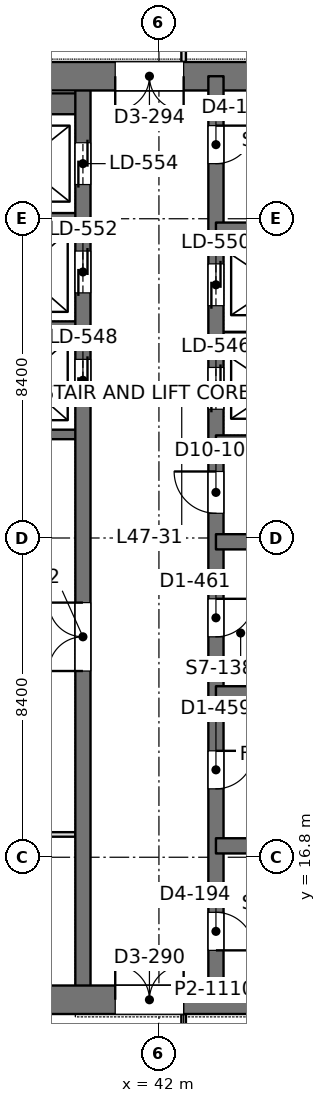
"""IFC4 building model, lengths in metres.
Left out: names, types, materials, properties, quantities, classifications, styles, units other than length and angle.
Written with IfcOpenShell. Run it as: python <this file> out.ifc"""

import sys

from ifc_helpers import new_model, si_unit, direction, frame, frame_2d, origin, place, context, subcontext, project, spatial, rectangle, extrude, element, fill, save


model = new_model("IFC4")
c1 = context("Model", 3, precision=1e-05, world=origin(), true_north=direction((0.0, 1.0)))
c2 = subcontext(c1, "Body", "Model", "MODEL_VIEW")
j1 = project(units=[si_unit("LENGTHUNIT", "METRE"), si_unit("PLANEANGLEUNIT", "RADIAN")], contexts=[c1])
p1 = place(None, origin())
s1 = spatial("IfcSite", under=j1, at=p1, CompositionType="ELEMENT")
p2 = place(p1, origin())
s2 = spatial("IfcBuilding", under=s1, at=p2, CompositionType="ELEMENT")
p3 = place(p2, frame((0.0, 0.0, 207.0)))
s3 = spatial("IfcBuildingStorey", under=s2, at=p3, CompositionType="ELEMENT", Elevation=207.0)
p4 = place(p3, frame((33.675, 13.05, 0.0), z_axis=(0.0, 0.0, 1.0), x_axis=(1.0, 0.0, 0.0)))
e1 = element("IfcWall", 1, at=p4, inside=s3, PredefinedType="SHEAR", context=c2, shape_type="SweptSolid", body=[
    extrude(rectangle(XDim=17.85, YDim=0.75, at=frame_2d((8.925, 0.0))), origin(), (0.0, 0.0, 1.0), 4.2),
])
p5 = place(p4, frame((7.175, 0.0, 0.0)))
e2 = element("IfcOpeningElement", 2, at=p5, cuts=e1, PredefinedType="OPENING", context=c2, shape_type="SweptSolid", body=[
    extrude(rectangle(XDim=1.8, YDim=2.4, at=frame_2d((0.9, 1.2))), frame((0.0, 0.385, 0.0), z_axis=(0.0, -1.0, 0.0), x_axis=(1.0, 0.0, 0.0)), (0.0, 0.0, 1.0), 0.77),
])
p6 = place(p3, frame((33.675, 37.35, 0.0), z_axis=(0.0, 0.0, 1.0), x_axis=(1.0, 0.0, 0.0)))
e3 = element("IfcWall", 3, at=p6, inside=s3, PredefinedType="SHEAR", context=c2, shape_type="SweptSolid", body=[
    extrude(rectangle(XDim=17.85, YDim=0.75, at=frame_2d((8.925, 0.0))), origin(), (0.0, 0.0, 1.0), 4.2),
])
p7 = place(p6, frame((7.175, 0.0, 0.0)))
e4 = element("IfcOpeningElement", 4, at=p7, cuts=e3, PredefinedType="OPENING", context=c2, shape_type="SweptSolid", body=[
    extrude(rectangle(XDim=1.8, YDim=2.4, at=frame_2d((0.9, 1.2))), frame((0.0, 0.385, 0.0), z_axis=(0.0, -1.0, 0.0), x_axis=(1.0, 0.0, 0.0)), (0.0, 0.0, 1.0), 0.77),
])
p8 = place(p3, frame((43.5, 13.05, 0.0), z_axis=(0.0, 0.0, 1.0), x_axis=(0.0, 1.0, 0.0)))
e5 = element("IfcWall", 5, at=p8, inside=s3, PredefinedType="SHEAR", context=c2, shape_type="SweptSolid", body=[
    extrude(rectangle(XDim=24.3, YDim=0.4, at=frame_2d((12.15, 0.0))), origin(), (0.0, 0.0, 1.0), 4.2),
])
p9 = place(p8, frame((1.3, 0.0, 0.0)))
e6 = element("IfcOpeningElement", 6, at=p9, cuts=e5, PredefinedType="OPENING", context=c2, shape_type="SweptSolid", body=[
    extrude(rectangle(XDim=1.0, YDim=2.2, at=frame_2d((0.5, 1.1))), frame((0.0, 0.21, 0.0), z_axis=(0.0, -1.0, 0.0), x_axis=(1.0, 0.0, 0.0)), (0.0, 0.0, 1.0), 0.42),
])
p10 = place(p8, frame((22.0, 0.0, 0.0)))
e7 = element("IfcOpeningElement", 7, at=p10, cuts=e5, PredefinedType="OPENING", context=c2, shape_type="SweptSolid", body=[
    extrude(rectangle(XDim=1.0, YDim=2.2, at=frame_2d((0.5, 1.1))), frame((0.0, 0.21, 0.0), z_axis=(0.0, -1.0, 0.0), x_axis=(1.0, 0.0, 0.0)), (0.0, 0.0, 1.0), 0.42),
])
p11 = place(p8, frame((5.55, 0.0, 0.0)))
e8 = element("IfcOpeningElement", 8, at=p11, cuts=e5, PredefinedType="OPENING", context=c2, shape_type="SweptSolid", body=[
    extrude(rectangle(XDim=1.0, YDim=2.2, at=frame_2d((0.5, 1.1))), frame((0.0, 0.21, 0.0), z_axis=(0.0, -1.0, 0.0), x_axis=(1.0, 0.0, 0.0)), (0.0, 0.0, 1.0), 0.42),
])
p12 = place(p8, frame((9.55, 0.0, 0.0)))
e9 = element("IfcOpeningElement", 9, at=p12, cuts=e5, PredefinedType="OPENING", context=c2, shape_type="SweptSolid", body=[
    extrude(rectangle(XDim=1.0, YDim=2.2, at=frame_2d((0.5, 1.1))), frame((0.0, 0.21, 0.0), z_axis=(0.0, -1.0, 0.0), x_axis=(1.0, 0.0, 0.0)), (0.0, 0.0, 1.0), 0.42),
])
p13 = place(p8, frame((12.8, 0.0, 0.0)))
e10 = element("IfcOpeningElement", 10, at=p13, cuts=e5, PredefinedType="OPENING", context=c2, shape_type="SweptSolid", body=[
    extrude(rectangle(XDim=1.1, YDim=2.2, at=frame_2d((0.55, 1.1))), frame((0.0, 0.21, 0.0), z_axis=(0.0, -1.0, 0.0), x_axis=(1.0, 0.0, 0.0)), (0.0, 0.0, 1.0), 0.42),
])
p14 = place(p8, frame((15.538, 0.0, 0.0)))
e11 = element("IfcOpeningElement", 11, at=p14, cuts=e5, PredefinedType="OPENING", context=c2, shape_type="SweptSolid", body=[
    extrude(rectangle(XDim=1.1, YDim=2.2, at=frame_2d((0.55, 1.1))), frame((0.0, 0.21, 0.0), z_axis=(0.0, -1.0, 0.0), x_axis=(1.0, 0.0, 0.0)), (0.0, 0.0, 1.0), 0.42),
])
p15 = place(p8, frame((18.262, 0.0, 0.0)))
e12 = element("IfcOpeningElement", 12, at=p15, cuts=e5, PredefinedType="OPENING", context=c2, shape_type="SweptSolid", body=[
    extrude(rectangle(XDim=1.1, YDim=2.2, at=frame_2d((0.55, 1.1))), frame((0.0, 0.21, 0.0), z_axis=(0.0, -1.0, 0.0), x_axis=(1.0, 0.0, 0.0)), (0.0, 0.0, 1.0), 0.42),
])
p16 = place(p3, frame((40.0, 13.05, 0.0), z_axis=(0.0, 0.0, 1.0), x_axis=(0.0, 1.0, 0.0)))
e13 = element("IfcWall", 13, at=p16, inside=s3, PredefinedType="SHEAR", context=c2, shape_type="SweptSolid", body=[
    extrude(rectangle(XDim=24.3, YDim=0.4, at=frame_2d((12.15, 0.0))), origin(), (0.0, 0.0, 1.0), 4.2),
])
p17 = place(p16, frame((15.75, 0.0, 0.0)))
e14 = element("IfcOpeningElement", 14, at=p17, cuts=e13, PredefinedType="OPENING", context=c2, shape_type="SweptSolid", body=[
    extrude(rectangle(XDim=1.1, YDim=2.2, at=frame_2d((0.55, 1.1))), frame((0.0, 0.21, 0.0), z_axis=(0.0, -1.0, 0.0), x_axis=(1.0, 0.0, 0.0)), (0.0, 0.0, 1.0), 0.42),
])
p18 = place(p16, frame((18.6, 0.0, 0.0)))
e15 = element("IfcOpeningElement", 15, at=p18, cuts=e13, PredefinedType="OPENING", context=c2, shape_type="SweptSolid", body=[
    extrude(rectangle(XDim=1.1, YDim=2.2, at=frame_2d((0.55, 1.1))), frame((0.0, 0.21, 0.0), z_axis=(0.0, -1.0, 0.0), x_axis=(1.0, 0.0, 0.0)), (0.0, 0.0, 1.0), 0.42),
])
p19 = place(p16, frame((21.45, 0.0, 0.0)))
e16 = element("IfcOpeningElement", 16, at=p19, cuts=e13, PredefinedType="OPENING", context=c2, shape_type="SweptSolid", body=[
    extrude(rectangle(XDim=1.1, YDim=2.2, at=frame_2d((0.55, 1.1))), frame((0.0, 0.21, 0.0), z_axis=(0.0, -1.0, 0.0), x_axis=(1.0, 0.0, 0.0)), (0.0, 0.0, 1.0), 0.42),
])
p20 = place(p16, frame((8.65, 0.0, 0.0)))
e17 = element("IfcOpeningElement", 17, at=p20, cuts=e13, PredefinedType="OPENING", context=c2, shape_type="SweptSolid", body=[
    extrude(rectangle(XDim=1.8, YDim=2.4, at=frame_2d((0.9, 1.2))), frame((0.0, 0.21, 0.0), z_axis=(0.0, -1.0, 0.0), x_axis=(1.0, 0.0, 0.0)), (0.0, 0.0, 1.0), 0.42),
])
for number, where, z_axis, x_axis in (
    (18, (51.15, 17.1, 0.0), (0.0, 0.0, 1.0), (-1.0, 0.0, 0.0)),
    (19, (51.15, 21.1, 0.0), (0.0, 0.0, 1.0), (-1.0, 0.0, 0.0)),
    (20, (51.15, 25.1, 0.0), (0.0, 0.0, 1.0), (-1.0, 0.0, 0.0)),
    (21, (51.15, 27.7, 0.0), (0.0, 0.0, 1.0), (-1.0, 0.0, 0.0)),
    (22, (51.15, 33.3, 0.0), (0.0, 0.0, 1.0), (-1.0, 0.0, 0.0)),
):
    element("IfcWall", number, at=place(p3, frame(where, z_axis=z_axis, x_axis=x_axis)), inside=s3, PredefinedType="SHEAR", context=c2, shape_type="SweptSolid", body=[
        extrude(rectangle(XDim=7.65, YDim=0.4, at=frame_2d((3.825, 0.0))), origin(), (0.0, 0.0, 1.0), 4.2),
    ])
p21 = place(p3, frame((46.7, 30.5, 0.0), z_axis=(0.0, 0.0, 1.0), x_axis=(-1.0, 0.0, 0.0)))
e23 = element("IfcWall", 23, at=p21, inside=s3, PredefinedType="SHEAR", context=c2, shape_type="SweptSolid", body=[
    extrude(rectangle(XDim=3.2, YDim=0.25, at=frame_2d((1.6, 0.0))), origin(), (0.0, 0.0, 1.0), 4.2),
])
p22 = place(p3, frame((40.0, 27.925, 0.0), z_axis=(0.0, 0.0, 1.0), x_axis=(-1.0, 0.0, 0.0)))
e24 = element("IfcWall", 24, at=p22, inside=s3, PredefinedType="SHEAR", context=c2, shape_type="SweptSolid", body=[
    extrude(rectangle(XDim=5.95, YDim=0.25, at=frame_2d((2.975, 0.0))), origin(), (0.0, 0.0, 1.0), 4.2),
])
for number, where, z_axis, x_axis in (
    (25, (40.0, 30.775, 0.0), (0.0, 0.0, 1.0), (-1.0, 0.0, 0.0)),
    (26, (40.0, 33.625, 0.0), (0.0, 0.0, 1.0), (-1.0, 0.0, 0.0)),
):
    element("IfcWall", number, at=place(p3, frame(where, z_axis=z_axis, x_axis=x_axis)), inside=s3, PredefinedType="SHEAR", context=c2, shape_type="SweptSolid", body=[
        extrude(rectangle(XDim=3.2, YDim=0.25, at=frame_2d((1.6, 0.0))), origin(), (0.0, 0.0, 1.0), 4.2),
    ])
p23 = place(p3, frame((40.0, 36.625, 0.0), z_axis=(0.0, 0.0, 1.0), x_axis=(-1.0, 0.0, 0.0)))
e27 = element("IfcWall", 27, at=p23, inside=s3, PredefinedType="SHEAR", context=c2, shape_type="SweptSolid", body=[
    extrude(rectangle(XDim=3.2, YDim=0.55, at=frame_2d((1.6, 0.0))), origin(), (0.0, 0.0, 1.0), 4.2),
])
p24 = place(p3, frame((33.898, 17.4, 0.0), z_axis=(0.0, 0.0, 1.0), x_axis=(1.0, 0.0, 0.0)))
e28 = element("IfcWall", 28, at=p24, inside=s3, PredefinedType="PARTITIONING", context=c2, shape_type="SweptSolid", body=[
    extrude(rectangle(XDim=5.904, YDim=0.12, at=frame_2d((2.952, 0.0))), origin(), (0.0, 0.0, 1.0), 3.55),
])
p25 = place(p3, frame((42.65, 11.158, 0.0), z_axis=(0.0, 0.0, 1.0), x_axis=(0.0, 1.0, 0.0)))
e29 = element("IfcWall", 29, at=p25, inside=s3, PredefinedType="PARTITIONING", context=c2, shape_type="SweptSolid", body=[
    extrude(rectangle(XDim=1.518, YDim=0.12, at=frame_2d((0.759, 0.0))), origin(), (0.0, 0.0, 1.0), 4.05),
])
p26 = place(p25, frame((0.192, 0.0, 0.0)))
e30 = element("IfcOpeningElement", 30, at=p26, cuts=e29, PredefinedType="OPENING", context=c2, shape_type="SweptSolid", body=[
    extrude(rectangle(XDim=1.0, YDim=2.4, at=frame_2d((0.5, 1.2))), frame((0.0, 0.07, 0.0), z_axis=(0.0, -1.0, 0.0), x_axis=(1.0, 0.0, 0.0)), (0.0, 0.0, 1.0), 0.14),
])
p27 = place(p3, frame((42.65, 37.724, 0.0), z_axis=(0.0, 0.0, 1.0), x_axis=(0.0, 1.0, 0.0)))
e31 = element("IfcWall", 31, at=p27, inside=s3, PredefinedType="PARTITIONING", context=c2, shape_type="SweptSolid", body=[
    extrude(rectangle(XDim=1.518, YDim=0.12, at=frame_2d((0.759, 0.0))), origin(), (0.0, 0.0, 1.0), 4.05),
])
p28 = place(p27, frame((0.326, 0.0, 0.0)))
e32 = element("IfcOpeningElement", 32, at=p28, cuts=e31, PredefinedType="OPENING", context=c2, shape_type="SweptSolid", body=[
    extrude(rectangle(XDim=1.0, YDim=2.4, at=frame_2d((0.5, 1.2))), frame((0.0, 0.07, 0.0), z_axis=(0.0, -1.0, 0.0), x_axis=(1.0, 0.0, 0.0)), (0.0, 0.0, 1.0), 0.14),
])
p29 = place(p5, origin())
e33 = element("IfcDoor", 33, at=p29, inside=s3, OperationType="DOUBLE_DOOR_SINGLE_SWING", PredefinedType="DOOR", context=c2, shape_type="SweptSolid", body=[
    extrude(rectangle(XDim=1.8, YDim=2.4, at=frame_2d((0.9, 1.2))), frame((0.0, 0.025, 0.0), z_axis=(0.0, -1.0, 0.0), x_axis=(1.0, 0.0, 0.0)), (0.0, 0.0, 1.0), 0.05),
])
fill(e2, e33)
p30 = place(p7, frame((1.8, 0.0, 0.0), z_axis=(0.0, 0.0, 1.0), x_axis=(-1.0, 0.0, 0.0)))
e34 = element("IfcDoor", 34, at=p30, inside=s3, OperationType="DOUBLE_DOOR_SINGLE_SWING", PredefinedType="DOOR", context=c2, shape_type="SweptSolid", body=[
    extrude(rectangle(XDim=1.8, YDim=2.4, at=frame_2d((0.9, 1.2))), frame((0.0, 0.025, 0.0), z_axis=(0.0, -1.0, 0.0), x_axis=(1.0, 0.0, 0.0)), (0.0, 0.0, 1.0), 0.05),
])
fill(e4, e34)
p31 = place(p9, frame((1.0, 0.0, 0.0), z_axis=(0.0, 0.0, 1.0), x_axis=(-1.0, 0.0, 0.0)))
e35 = element("IfcDoor", 35, at=p31, inside=s3, OperationType="SINGLE_SWING_RIGHT", PredefinedType="DOOR", context=c2, shape_type="SweptSolid", body=[
    extrude(rectangle(XDim=1.0, YDim=2.2, at=frame_2d((0.5, 1.1))), frame((0.0, 0.025, 0.0), z_axis=(0.0, -1.0, 0.0), x_axis=(1.0, 0.0, 0.0)), (0.0, 0.0, 1.0), 0.05),
])
fill(e6, e35)
p32 = place(p10, frame((1.0, 0.0, 0.0), z_axis=(0.0, 0.0, 1.0), x_axis=(-1.0, 0.0, 0.0)))
e36 = element("IfcDoor", 36, at=p32, inside=s3, OperationType="SINGLE_SWING_LEFT", PredefinedType="DOOR", context=c2, shape_type="SweptSolid", body=[
    extrude(rectangle(XDim=1.0, YDim=2.2, at=frame_2d((0.5, 1.1))), frame((0.0, 0.025, 0.0), z_axis=(0.0, -1.0, 0.0), x_axis=(1.0, 0.0, 0.0)), (0.0, 0.0, 1.0), 0.05),
])
fill(e7, e36)
p33 = place(p11, frame((1.0, 0.0, 0.0), z_axis=(0.0, 0.0, 1.0), x_axis=(-1.0, 0.0, 0.0)))
e37 = element("IfcDoor", 37, at=p33, inside=s3, OperationType="SINGLE_SWING_LEFT", PredefinedType="DOOR", context=c2, shape_type="SweptSolid", body=[
    extrude(rectangle(XDim=1.0, YDim=2.2, at=frame_2d((0.5, 1.1))), frame((0.0, 0.025, 0.0), z_axis=(0.0, -1.0, 0.0), x_axis=(1.0, 0.0, 0.0)), (0.0, 0.0, 1.0), 0.05),
])
fill(e8, e37)
p34 = place(p12, frame((1.0, 0.0, 0.0), z_axis=(0.0, 0.0, 1.0), x_axis=(-1.0, 0.0, 0.0)))
e38 = element("IfcDoor", 38, at=p34, inside=s3, OperationType="SINGLE_SWING_LEFT", PredefinedType="DOOR", context=c2, shape_type="SweptSolid", body=[
    extrude(rectangle(XDim=1.0, YDim=2.2, at=frame_2d((0.5, 1.1))), frame((0.0, 0.025, 0.0), z_axis=(0.0, -1.0, 0.0), x_axis=(1.0, 0.0, 0.0)), (0.0, 0.0, 1.0), 0.05),
])
fill(e9, e38)
p35 = place(p13, origin())
e39 = element("IfcDoor", 39, at=p35, inside=s3, OperationType="SINGLE_SWING_RIGHT", PredefinedType="DOOR", context=c2, shape_type="SweptSolid", body=[
    extrude(rectangle(XDim=1.1, YDim=2.2, at=frame_2d((0.55, 1.1))), frame((0.0, 0.025, 0.0), z_axis=(0.0, -1.0, 0.0), x_axis=(1.0, 0.0, 0.0)), (0.0, 0.0, 1.0), 0.05),
])
fill(e10, e39)
p36 = place(p17, origin())
e40 = element("IfcDoor", 40, at=p36, inside=s3, OperationType="DOUBLE_DOOR_SLIDING", PredefinedType="DOOR", context=c2, shape_type="SweptSolid", body=[
    extrude(rectangle(XDim=1.1, YDim=2.2, at=frame_2d((0.55, 1.1))), frame((0.0, 0.025, 0.0), z_axis=(0.0, -1.0, 0.0), x_axis=(1.0, 0.0, 0.0)), (0.0, 0.0, 1.0), 0.05),
])
fill(e14, e40)
p37 = place(p18, origin())
e41 = element("IfcDoor", 41, at=p37, inside=s3, OperationType="DOUBLE_DOOR_SLIDING", PredefinedType="DOOR", context=c2, shape_type="SweptSolid", body=[
    extrude(rectangle(XDim=1.1, YDim=2.2, at=frame_2d((0.55, 1.1))), frame((0.0, 0.025, 0.0), z_axis=(0.0, -1.0, 0.0), x_axis=(1.0, 0.0, 0.0)), (0.0, 0.0, 1.0), 0.05),
])
fill(e15, e41)
p38 = place(p19, origin())
e42 = element("IfcDoor", 42, at=p38, inside=s3, OperationType="DOUBLE_DOOR_SLIDING", PredefinedType="DOOR", context=c2, shape_type="SweptSolid", body=[
    extrude(rectangle(XDim=1.1, YDim=2.2, at=frame_2d((0.55, 1.1))), frame((0.0, 0.025, 0.0), z_axis=(0.0, -1.0, 0.0), x_axis=(1.0, 0.0, 0.0)), (0.0, 0.0, 1.0), 0.05),
])
fill(e16, e42)
p39 = place(p14, origin())
e43 = element("IfcDoor", 43, at=p39, inside=s3, OperationType="DOUBLE_DOOR_SLIDING", PredefinedType="DOOR", context=c2, shape_type="SweptSolid", body=[
    extrude(rectangle(XDim=1.1, YDim=2.2, at=frame_2d((0.55, 1.1))), frame((0.0, 0.025, 0.0), z_axis=(0.0, -1.0, 0.0), x_axis=(1.0, 0.0, 0.0)), (0.0, 0.0, 1.0), 0.05),
])
fill(e11, e43)
p40 = place(p15, origin())
e44 = element("IfcDoor", 44, at=p40, inside=s3, OperationType="DOUBLE_DOOR_SLIDING", PredefinedType="DOOR", context=c2, shape_type="SweptSolid", body=[
    extrude(rectangle(XDim=1.1, YDim=2.2, at=frame_2d((0.55, 1.1))), frame((0.0, 0.025, 0.0), z_axis=(0.0, -1.0, 0.0), x_axis=(1.0, 0.0, 0.0)), (0.0, 0.0, 1.0), 0.05),
])
fill(e12, e44)
p41 = place(p20, origin())
e45 = element("IfcDoor", 45, at=p41, inside=s3, OperationType="DOUBLE_DOOR_SINGLE_SWING", PredefinedType="DOOR", context=c2, shape_type="SweptSolid", body=[
    extrude(rectangle(XDim=1.8, YDim=2.4, at=frame_2d((0.9, 1.2))), frame((0.0, 0.025, 0.0), z_axis=(0.0, -1.0, 0.0), x_axis=(1.0, 0.0, 0.0)), (0.0, 0.0, 1.0), 0.05),
])
fill(e17, e45)
save(model, sys.argv[1])
